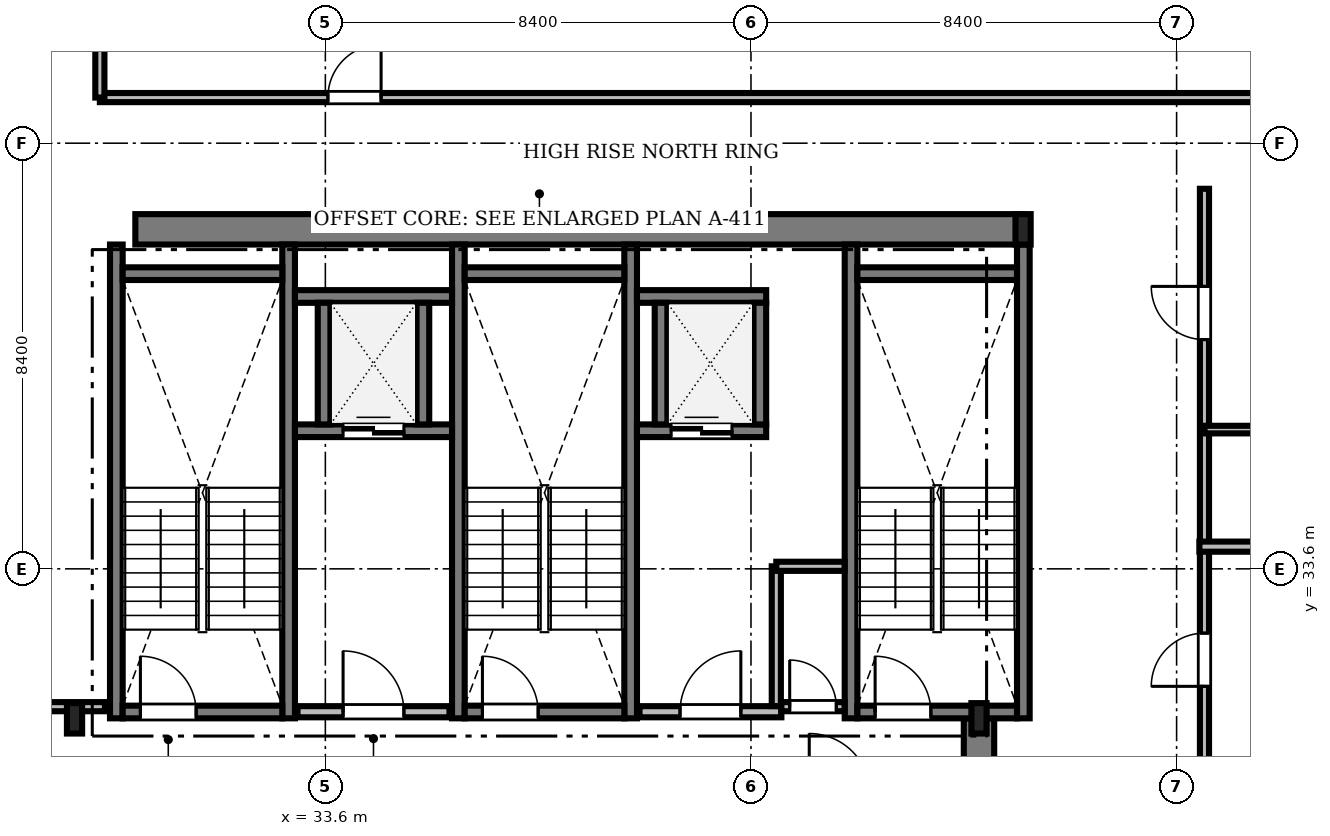
"""IFC4 building model, lengths in metres.
Left out: names, types, materials, properties, quantities, classifications, styles, units other than length and angle.
Written with IfcOpenShell. Run it as: python <this file> out.ifc"""

import sys

from ifc_helpers import new_model, si_unit, direction, frame, frame_2d, origin, origin_2d, place, context, subcontext, project, spatial, rectangle, i_section, extrude, source, transform, mapped, element, fill, save


model = new_model("IFC4")
c1 = context("Model", 3, precision=1e-05, world=origin(), true_north=direction((0.0, 1.0)))
c2 = subcontext(c1, "Body", "Model", "MODEL_VIEW")
j1 = project(units=[si_unit("LENGTHUNIT", "METRE"), si_unit("PLANEANGLEUNIT", "RADIAN")], contexts=[c1])
p1 = place(None, origin())
s1 = spatial("IfcSite", under=j1, at=p1, CompositionType="ELEMENT")
p2 = place(p1, origin())
s2 = spatial("IfcBuilding", under=s1, at=p2, CompositionType="ELEMENT")
p3 = place(p2, frame((0.0, 0.0, 246.65)))
s3 = spatial("IfcBuildingStorey", under=s2, at=p3, CompositionType="ELEMENT", Elevation=246.65)
m1 = source(origin(), c2, "Body", "SweptSolid", [
    extrude(rectangle(XDim=17.52, YDim=0.6, at=frame_2d((8.76, 0.0))), origin(), (0.0, 0.0, 1.0), 3.73),
])
p4 = place(p3, frame((29.85, 40.3, 0.0), z_axis=(0.0, 0.0, 1.0), x_axis=(1.0, 0.0, 0.0)))
e1 = element("IfcWall", 1, at=p4, inside=s3, PredefinedType="SHEAR", context=c2, shape_type="MappedRepresentation", body=[
    mapped(m1, transform((0.0, 0.0, 0.0), scale=1.0)),
])
m2 = source(origin(), c2, "Body", "SweptSolid", [
    extrude(rectangle(XDim=13.15, YDim=0.6, at=frame_2d((6.575, 0.0))), origin(), (0.0, 0.0, 1.0), 3.73),
])
p5 = place(p3, frame((46.5, 17.5, 0.0), z_axis=(0.0, 0.0, 1.0), x_axis=(0.0, 1.0, 0.0)))
e2 = element("IfcWall", 2, at=p5, inside=s3, PredefinedType="SHEAR", context=c2, shape_type="MappedRepresentation", body=[
    mapped(m2, transform((0.0, 0.0, 0.0), scale=1.0)),
])
m3 = source(origin(), c2, "Body", "SweptSolid", [
    extrude(i_section(OverallWidth=0.3, OverallDepth=0.6, WebThickness=0.015, FlangeThickness=0.03, FilletRadius=0.027, at=origin_2d()), origin(), (0.0, 0.0, 1.0), 3.73),
])
for number, where, z_axis, x_axis in (
    (3, (28.65, 30.65, 0.0), (0.0, 0.0, 1.0), (1.0, 0.0, 0.0)),
    (4, (46.5, 30.65, 0.0), (0.0, 0.0, 1.0), (1.0, 0.0, 0.0)),
    (5, (47.37, 40.3, 0.0), (0.0, 0.0, 1.0), (1.0, 0.0, 0.0)),
):
    element("IfcColumn", number, at=place(p3, frame(where, z_axis=z_axis, x_axis=x_axis)), inside=s3, PredefinedType="COLUMN", context=c2, shape_type="MappedRepresentation", body=[
        mapped(m3, transform((0.0, 0.0, 0.0), scale=1.0)),
    ])
m4 = source(origin(), c2, "Body", "SweptSolid", [
    extrude(rectangle(XDim=9.35, YDim=0.25, at=frame_2d((4.675, 0.0))), origin(), (0.0, 0.0, 1.0), 3.75),
])
for number, where, z_axis, x_axis in (
    (6, (29.475, 30.65, 0.0), (0.0, 0.0, 1.0), (0.0, 1.0, 0.0)),
    (7, (32.875, 30.65, 0.0), (0.0, 0.0, 1.0), (0.0, 1.0, 0.0)),
):
    element("IfcWall", number, at=place(p3, frame(where, z_axis=z_axis, x_axis=x_axis)), inside=s3, PredefinedType="SOLIDWALL", context=c2, shape_type="MappedRepresentation", body=[
        mapped(m4, transform((0.0, 0.0, 0.0), scale=1.0)),
    ])
m5 = source(origin(), c2, "Body", "SweptSolid", [
    extrude(rectangle(XDim=3.15, YDim=0.25, at=frame_2d((1.575, 0.0))), origin(), (0.0, 0.0, 1.0), 3.75),
])
p6 = place(p3, frame((29.6, 39.425, 0.0), z_axis=(0.0, 0.0, 1.0), x_axis=(1.0, 0.0, 0.0)))
e8 = element("IfcWall", 8, at=p6, inside=s3, PredefinedType="SOLIDWALL", context=c2, shape_type="MappedRepresentation", body=[
    mapped(m5, transform((0.0, 0.0, 0.0), scale=1.0)),
])
p7 = place(p3, frame((29.6, 30.775, 0.0), z_axis=(0.0, 0.0, 1.0), x_axis=(1.0, 0.0, 0.0)))
e9 = element("IfcWall", 9, at=p7, inside=s3, PredefinedType="SOLIDWALL", context=c2, shape_type="MappedRepresentation", body=[
    mapped(m5, transform((0.0, 0.0, 0.0), scale=1.0)),
])
m6 = source(origin(), c2, "Body", "SweptSolid", [
    extrude(rectangle(XDim=1.1, YDim=2.2, at=frame_2d((0.55, 1.1))), frame((0.0, 0.135, 0.0), z_axis=(0.0, -1.0, 0.0), x_axis=(1.0, 0.0, 0.0)), (0.0, 0.0, 1.0), 0.27),
])
p8 = place(p7, frame((0.35, 0.0, 0.0)))
e10 = element("IfcOpeningElement", 10, at=p8, cuts=e9, PredefinedType="OPENING", context=c2, shape_type="MappedRepresentation", body=[
    mapped(m6, transform((0.0, 0.0, 0.0), scale=1.0)),
])
for number, where, z_axis, x_axis in (
    (11, (36.225, 30.65, 0.0), (0.0, 0.0, 1.0), (0.0, 1.0, 0.0)),
    (12, (39.625, 30.65, 0.0), (0.0, 0.0, 1.0), (0.0, 1.0, 0.0)),
):
    element("IfcWall", number, at=place(p3, frame(where, z_axis=z_axis, x_axis=x_axis)), inside=s3, PredefinedType="SOLIDWALL", context=c2, shape_type="MappedRepresentation", body=[
        mapped(m4, transform((0.0, 0.0, 0.0), scale=1.0)),
    ])
p9 = place(p3, frame((36.35, 39.425, 0.0), z_axis=(0.0, 0.0, 1.0), x_axis=(1.0, 0.0, 0.0)))
e13 = element("IfcWall", 13, at=p9, inside=s3, PredefinedType="SOLIDWALL", context=c2, shape_type="MappedRepresentation", body=[
    mapped(m5, transform((0.0, 0.0, 0.0), scale=1.0)),
])
p10 = place(p3, frame((36.35, 30.775, 0.0), z_axis=(0.0, 0.0, 1.0), x_axis=(1.0, 0.0, 0.0)))
e14 = element("IfcWall", 14, at=p10, inside=s3, PredefinedType="SOLIDWALL", context=c2, shape_type="MappedRepresentation", body=[
    mapped(m5, transform((0.0, 0.0, 0.0), scale=1.0)),
])
p11 = place(p10, frame((0.35, 0.0, 0.0)))
e15 = element("IfcOpeningElement", 15, at=p11, cuts=e14, PredefinedType="OPENING", context=c2, shape_type="MappedRepresentation", body=[
    mapped(m6, transform((0.0, 0.0, 0.0), scale=1.0)),
])
for number, where, z_axis, x_axis in (
    (16, (43.975, 30.65, 0.0), (0.0, 0.0, 1.0), (0.0, 1.0, 0.0)),
    (17, (47.375, 30.65, 0.0), (0.0, 0.0, 1.0), (0.0, 1.0, 0.0)),
):
    element("IfcWall", number, at=place(p3, frame(where, z_axis=z_axis, x_axis=x_axis)), inside=s3, PredefinedType="SOLIDWALL", context=c2, shape_type="MappedRepresentation", body=[
        mapped(m4, transform((0.0, 0.0, 0.0), scale=1.0)),
    ])
p12 = place(p3, frame((44.1, 39.425, 0.0), z_axis=(0.0, 0.0, 1.0), x_axis=(1.0, 0.0, 0.0)))
e18 = element("IfcWall", 18, at=p12, inside=s3, PredefinedType="SOLIDWALL", context=c2, shape_type="MappedRepresentation", body=[
    mapped(m5, transform((0.0, 0.0, 0.0), scale=1.0)),
])
p13 = place(p3, frame((44.1, 30.775, 0.0), z_axis=(0.0, 0.0, 1.0), x_axis=(1.0, 0.0, 0.0)))
e19 = element("IfcWall", 19, at=p13, inside=s3, PredefinedType="SOLIDWALL", context=c2, shape_type="MappedRepresentation", body=[
    mapped(m5, transform((0.0, 0.0, 0.0), scale=1.0)),
])
p14 = place(p13, frame((0.35, 0.0, 0.0)))
e20 = element("IfcOpeningElement", 20, at=p14, cuts=e19, PredefinedType="OPENING", context=c2, shape_type="MappedRepresentation", body=[
    mapped(m6, transform((0.0, 0.0, 0.0), scale=1.0)),
])
m7 = source(origin(), c2, "Body", "SweptSolid", [
    extrude(rectangle(XDim=3.0, YDim=0.22, at=frame_2d((1.5, 0.0))), origin(), (0.0, 0.0, 1.0), 3.73),
])
p15 = place(p3, frame((33.05, 30.78, 0.0), z_axis=(0.0, 0.0, 1.0), x_axis=(1.0, 0.0, 0.0)))
e21 = element("IfcWall", 21, at=p15, inside=s3, PredefinedType="SOLIDWALL", context=c2, shape_type="MappedRepresentation", body=[
    mapped(m7, transform((0.0, 0.0, 0.0), scale=1.0)),
])
m8 = source(origin(), c2, "Body", "SweptSolid", [
    extrude(rectangle(XDim=1.2, YDim=2.2, at=frame_2d((0.6, 1.1))), frame((0.0, 0.12, 0.0), z_axis=(0.0, -1.0, 0.0), x_axis=(1.0, 0.0, 0.0)), (0.0, 0.0, 1.0), 0.24),
])
p16 = place(p15, frame((0.9, 0.0, 0.0)))
e22 = element("IfcOpeningElement", 22, at=p16, cuts=e21, PredefinedType="OPENING", context=c2, shape_type="MappedRepresentation", body=[
    mapped(m8, transform((0.0, 0.0, 0.0), scale=1.0)),
])
m9 = source(origin(), c2, "Body", "SweptSolid", [
    extrude(rectangle(XDim=2.8, YDim=0.22, at=frame_2d((1.4, 0.0))), origin(), (0.0, 0.0, 1.0), 3.73),
])
p17 = place(p3, frame((39.8, 30.78, 0.0), z_axis=(0.0, 0.0, 1.0), x_axis=(1.0, 0.0, 0.0)))
e23 = element("IfcWall", 23, at=p17, inside=s3, PredefinedType="SOLIDWALL", context=c2, shape_type="MappedRepresentation", body=[
    mapped(m9, transform((0.0, 0.0, 0.0), scale=1.0)),
])
p18 = place(p17, frame((0.8, 0.0, 0.0)))
e24 = element("IfcOpeningElement", 24, at=p18, cuts=e23, PredefinedType="OPENING", context=c2, shape_type="MappedRepresentation", body=[
    mapped(m8, transform((0.0, 0.0, 0.0), scale=1.0)),
])
m10 = source(origin(), c2, "Body", "SweptSolid", [
    extrude(rectangle(XDim=3.1, YDim=0.25, at=frame_2d((1.55, 0.0))), origin(), (0.0, 0.0, 1.0), 3.73),
])
p19 = place(p3, frame((33.0, 36.325, 0.0), z_axis=(0.0, 0.0, 1.0), x_axis=(1.0, 0.0, 0.0)))
e25 = element("IfcWall", 25, at=p19, inside=s3, PredefinedType="SOLIDWALL", context=c2, shape_type="MappedRepresentation", body=[
    mapped(m10, transform((0.0, 0.0, 0.0), scale=1.0)),
])
m11 = source(origin(), c2, "Body", "SweptSolid", [
    extrude(rectangle(XDim=1.2, YDim=2.25, at=frame_2d((0.6, 1.125))), frame((0.0, 0.135, 0.0), z_axis=(0.0, -1.0, 0.0), x_axis=(1.0, 0.0, 0.0)), (0.0, 0.0, 1.0), 0.27),
])
p20 = place(p19, frame((0.95, 0.0, 0.0)))
e26 = element("IfcOpeningElement", 26, at=p20, cuts=e25, PredefinedType="OPENING", context=c2, shape_type="MappedRepresentation", body=[
    mapped(m11, transform((0.0, 0.0, 0.0), scale=1.0)),
])
p21 = place(p3, frame((33.0, 38.975, 0.0), z_axis=(0.0, 0.0, 1.0), x_axis=(1.0, 0.0, 0.0)))
e27 = element("IfcWall", 27, at=p21, inside=s3, PredefinedType="SOLIDWALL", context=c2, shape_type="MappedRepresentation", body=[
    mapped(m10, transform((0.0, 0.0, 0.0), scale=1.0)),
])
m12 = source(origin(), c2, "Body", "SweptSolid", [
    extrude(rectangle(XDim=2.4, YDim=0.25, at=frame_2d((1.2, 0.0))), origin(), (0.0, 0.0, 1.0), 3.73),
])
for number, where, z_axis, x_axis in (
    (28, (33.575, 36.45, 0.0), (0.0, 0.0, 1.0), (0.0, 1.0, 0.0)),
    (29, (35.525, 36.45, 0.0), (0.0, 0.0, 1.0), (0.0, 1.0, 0.0)),
):
    element("IfcWall", number, at=place(p3, frame(where, z_axis=z_axis, x_axis=x_axis)), inside=s3, PredefinedType="SOLIDWALL", context=c2, shape_type="MappedRepresentation", body=[
        mapped(m12, transform((0.0, 0.0, 0.0), scale=1.0)),
    ])
m13 = source(origin(), c2, "Body", "SweptSolid", [
    extrude(rectangle(XDim=2.55, YDim=0.25, at=frame_2d((1.275, 0.0))), origin(), (0.0, 0.0, 1.0), 3.73),
])
p22 = place(p3, frame((39.75, 36.325, 0.0), z_axis=(0.0, 0.0, 1.0), x_axis=(1.0, 0.0, 0.0)))
e30 = element("IfcWall", 30, at=p22, inside=s3, PredefinedType="SOLIDWALL", context=c2, shape_type="MappedRepresentation", body=[
    mapped(m13, transform((0.0, 0.0, 0.0), scale=1.0)),
])
p23 = place(p22, frame((0.675, 0.0, 0.0)))
e31 = element("IfcOpeningElement", 31, at=p23, cuts=e30, PredefinedType="OPENING", context=c2, shape_type="MappedRepresentation", body=[
    mapped(m11, transform((0.0, 0.0, 0.0), scale=1.0)),
])
p24 = place(p3, frame((39.75, 38.975, 0.0), z_axis=(0.0, 0.0, 1.0), x_axis=(1.0, 0.0, 0.0)))
e32 = element("IfcWall", 32, at=p24, inside=s3, PredefinedType="SOLIDWALL", context=c2, shape_type="MappedRepresentation", body=[
    mapped(m13, transform((0.0, 0.0, 0.0), scale=1.0)),
])
for number, where, z_axis, x_axis in (
    (33, (40.225, 36.45, 0.0), (0.0, 0.0, 1.0), (0.0, 1.0, 0.0)),
    (34, (42.175, 36.45, 0.0), (0.0, 0.0, 1.0), (0.0, 1.0, 0.0)),
):
    element("IfcWall", number, at=place(p3, frame(where, z_axis=z_axis, x_axis=x_axis)), inside=s3, PredefinedType="SOLIDWALL", context=c2, shape_type="MappedRepresentation", body=[
        mapped(m12, transform((0.0, 0.0, 0.0), scale=1.0)),
    ])
m14 = source(origin(), c2, "Body", "SweptSolid", [
    extrude(rectangle(XDim=32.928, YDim=0.18, at=frame_2d((16.464, 0.0))), origin(), (0.0, 0.0, 1.0), 2.972),
])
p25 = place(p3, frame((29.15, 42.9, 0.0), z_axis=(0.0, 0.0, 1.0), x_axis=(1.0, 0.0, 0.0)))
e35 = element("IfcWall", 35, at=p25, inside=s3, PredefinedType="PARTITIONING", context=c2, shape_type="MappedRepresentation", body=[
    mapped(m14, transform((0.0, 0.0, 0.0), scale=1.0)),
])
m15 = source(origin(), c2, "Body", "SweptSolid", [
    extrude(rectangle(XDim=1.05, YDim=2.2, at=frame_2d((0.525, 1.1))), frame((0.0, 0.1, 0.0), z_axis=(0.0, -1.0, 0.0), x_axis=(1.0, 0.0, 0.0)), (0.0, 0.0, 1.0), 0.2),
])
p26 = place(p25, frame((4.5, 0.0, 0.0)))
e36 = element("IfcOpeningElement", 36, at=p26, cuts=e35, PredefinedType="OPENING", context=c2, shape_type="MappedRepresentation", body=[
    mapped(m15, transform((0.0, 0.0, 0.0), scale=1.0)),
])
m16 = source(origin(), c2, "Body", "SweptSolid", [
    extrude(rectangle(XDim=27.59, YDim=0.18, at=frame_2d((13.795, 0.0))), origin(), (0.0, 0.0, 1.0), 3.172),
])
p27 = place(p3, frame((50.95, 13.51, 0.0), z_axis=(0.0, 0.0, 1.0), x_axis=(0.0, 1.0, 0.0)))
e37 = element("IfcWall", 37, at=p27, inside=s3, PredefinedType="PARTITIONING", context=c2, shape_type="MappedRepresentation", body=[
    mapped(m16, transform((0.0, 0.0, 0.0), scale=1.0)),
])
p28 = place(p27, frame((4.086, 0.0, 0.0)))
e38 = element("IfcOpeningElement", 38, at=p28, cuts=e37, PredefinedType="OPENING", context=c2, shape_type="MappedRepresentation", body=[
    mapped(m15, transform((0.0, 0.0, 0.0), scale=1.0)),
])
p29 = place(p27, frame((9.744, 0.0, 0.0)))
e39 = element("IfcOpeningElement", 39, at=p29, cuts=e37, PredefinedType="OPENING", context=c2, shape_type="MappedRepresentation", body=[
    mapped(m15, transform((0.0, 0.0, 0.0), scale=1.0)),
])
p30 = place(p27, frame((17.771, 0.0, 0.0)))
e40 = element("IfcOpeningElement", 40, at=p30, cuts=e37, PredefinedType="OPENING", context=c2, shape_type="MappedRepresentation", body=[
    mapped(m15, transform((0.0, 0.0, 0.0), scale=1.0)),
])
p31 = place(p27, frame((24.614, 0.0, 0.0)))
e41 = element("IfcOpeningElement", 41, at=p31, cuts=e37, PredefinedType="OPENING", context=c2, shape_type="MappedRepresentation", body=[
    mapped(m15, transform((0.0, 0.0, 0.0), scale=1.0)),
])
m17 = source(origin(), c2, "Body", "SweptSolid", [
    extrude(rectangle(XDim=13.328, YDim=0.18, at=frame_2d((6.664, 0.0))), origin(), (0.0, 0.0, 1.0), 2.972),
])
p32 = place(p3, frame((15.922, 30.88, 0.0), z_axis=(0.0, 0.0, 1.0), x_axis=(1.0, 0.0, 0.0)))
e42 = element("IfcWall", 42, at=p32, inside=s3, PredefinedType="PARTITIONING", context=c2, shape_type="MappedRepresentation", body=[
    mapped(m17, transform((0.0, 0.0, 0.0), scale=1.0)),
])
p33 = place(p32, frame((6.278, 0.0, 0.0)))
e43 = element("IfcOpeningElement", 43, at=p33, cuts=e42, PredefinedType="OPENING", context=c2, shape_type="MappedRepresentation", body=[
    mapped(m15, transform((0.0, 0.0, 0.0), scale=1.0)),
])
m18 = source(origin(), c2, "Body", "SweptSolid", [
    extrude(rectangle(XDim=1.248, YDim=0.18, at=frame_2d((0.624, 0.0))), origin(), (0.0, 0.0, 1.0), 3.73),
])
p34 = place(p3, frame((42.6, 30.88, 0.0), z_axis=(0.0, 0.0, 1.0), x_axis=(1.0, 0.0, 0.0)))
e44 = element("IfcWall", 44, at=p34, inside=s3, PredefinedType="PARTITIONING", context=c2, shape_type="MappedRepresentation", body=[
    mapped(m18, transform((0.0, 0.0, 0.0), scale=1.0)),
])
m19 = source(origin(), c2, "Body", "SweptSolid", [
    extrude(rectangle(XDim=0.92, YDim=2.1, at=frame_2d((0.46, 1.05))), frame((0.0, 0.1, 0.0), z_axis=(0.0, -1.0, 0.0), x_axis=(1.0, 0.0, 0.0)), (0.0, 0.0, 1.0), 0.2),
])
p35 = place(p34, frame((0.164, 0.0, 0.0)))
e45 = element("IfcOpeningElement", 45, at=p35, cuts=e44, PredefinedType="OPENING", context=c2, shape_type="MappedRepresentation", body=[
    mapped(m19, transform((0.0, 0.0, 0.0), scale=1.0)),
])
m20 = source(origin(), c2, "Body", "SweptSolid", [
    extrude(rectangle(XDim=11.228, YDim=0.2, at=frame_2d((5.614, 0.0))), origin(), (0.0, 0.0, 1.0), 2.972),
])
p36 = place(p3, frame((50.85, 34.038, 0.0), z_axis=(0.0, 0.0, 1.0), x_axis=(1.0, 0.0, 0.0)))
e46 = element("IfcWall", 46, at=p36, inside=s3, PredefinedType="PARTITIONING", context=c2, shape_type="MappedRepresentation", body=[
    mapped(m20, transform((0.0, 0.0, 0.0), scale=1.0)),
])
m21 = source(origin(), c2, "Body", "SweptSolid", [
    extrude(rectangle(XDim=5.378, YDim=0.18, at=frame_2d((2.689, 0.0))), origin(), (0.0, 0.0, 1.0), 2.972),
])
p37 = place(p3, frame((29.15, 42.9, 0.0), z_axis=(0.0, 0.0, 1.0), x_axis=(0.0, 1.0, 0.0)))
e47 = element("IfcWall", 47, at=p37, inside=s3, PredefinedType="PARTITIONING", context=c2, shape_type="MappedRepresentation", body=[
    mapped(m21, transform((0.0, 0.0, 0.0), scale=1.0)),
])
m22 = source(origin(), c2, "Body", "SweptSolid", [
    extrude(rectangle(XDim=2.758, YDim=0.18, at=frame_2d((1.379, 0.0))), origin(), (0.0, 0.0, 1.0), 3.73),
])
p38 = place(p3, frame((42.5, 30.892, 0.0), z_axis=(0.0, 0.0, 1.0), x_axis=(0.0, 1.0, 0.0)))
e48 = element("IfcWall", 48, at=p38, inside=s3, PredefinedType="PARTITIONING", context=c2, shape_type="MappedRepresentation", body=[
    mapped(m22, transform((0.0, 0.0, 0.0), scale=1.0)),
])
m23 = source(origin(), c2, "Body", "SweptSolid", [
    extrude(rectangle(XDim=2.36, YDim=0.15, at=frame_2d((1.18, 0.0))), origin(), (0.0, 0.0, 1.0), 3.73),
])
p39 = place(p3, frame((50.95, 36.348, 0.0), z_axis=(0.0, 0.0, 1.0), x_axis=(1.0, 0.0, 0.0)))
e49 = element("IfcWall", 49, at=p39, inside=s3, PredefinedType="PARTITIONING", context=c2, shape_type="MappedRepresentation", body=[
    mapped(m23, transform((0.0, 0.0, 0.0), scale=1.0)),
])
m24 = source(origin(), c2, "Body", "SweptSolid", [
    extrude(rectangle(XDim=1.348, YDim=0.18, at=frame_2d((0.674, 0.0))), origin(), (0.0, 0.0, 1.0), 3.73),
])
p40 = place(p3, frame((42.5, 33.65, 0.0), z_axis=(0.0, 0.0, 1.0), x_axis=(1.0, 0.0, 0.0)))
e50 = element("IfcWall", 50, at=p40, inside=s3, PredefinedType="PARTITIONING", context=c2, shape_type="MappedRepresentation", body=[
    mapped(m24, transform((0.0, 0.0, 0.0), scale=1.0)),
])
m25 = source(origin(), c2, "Body", "SweptSolid", [
    extrude(rectangle(XDim=1.1, YDim=2.2, at=frame_2d((0.55, 1.1))), frame((0.0, 0.025, 0.0), z_axis=(0.0, -1.0, 0.0), x_axis=(1.0, 0.0, 0.0)), (0.0, 0.0, 1.0), 0.05),
])
p41 = place(p8, origin())
e51 = element("IfcDoor", 51, at=p41, inside=s3, OperationType="SINGLE_SWING_LEFT", PredefinedType="DOOR", context=c2, shape_type="MappedRepresentation", body=[
    mapped(m25, transform((0.0, 0.0, 0.0), scale=1.0)),
])
fill(e10, e51)
p42 = place(p11, origin())
e52 = element("IfcDoor", 52, at=p42, inside=s3, OperationType="SINGLE_SWING_LEFT", PredefinedType="DOOR", context=c2, shape_type="MappedRepresentation", body=[
    mapped(m25, transform((0.0, 0.0, 0.0), scale=1.0)),
])
fill(e15, e52)
p43 = place(p14, origin())
e53 = element("IfcDoor", 53, at=p43, inside=s3, OperationType="SINGLE_SWING_LEFT", PredefinedType="DOOR", context=c2, shape_type="MappedRepresentation", body=[
    mapped(m25, transform((0.0, 0.0, 0.0), scale=1.0)),
])
fill(e20, e53)
m26 = source(origin(), c2, "Body", "SweptSolid", [
    extrude(rectangle(XDim=1.2, YDim=2.2, at=frame_2d((0.6, 1.1))), frame((0.0, 0.025, 0.0), z_axis=(0.0, -1.0, 0.0), x_axis=(1.0, 0.0, 0.0)), (0.0, 0.0, 1.0), 0.05),
])
p44 = place(p16, origin())
e54 = element("IfcDoor", 54, at=p44, inside=s3, OperationType="SINGLE_SWING_LEFT", PredefinedType="DOOR", context=c2, shape_type="MappedRepresentation", body=[
    mapped(m26, transform((0.0, 0.0, 0.0), scale=1.0)),
])
fill(e22, e54)
p45 = place(p18, origin())
e55 = element("IfcDoor", 55, at=p45, inside=s3, OperationType="SINGLE_SWING_RIGHT", PredefinedType="DOOR", context=c2, shape_type="MappedRepresentation", body=[
    mapped(m26, transform((0.0, 0.0, 0.0), scale=1.0)),
])
fill(e24, e55)
m27 = source(origin(), c2, "Body", "SweptSolid", [
    extrude(rectangle(XDim=1.2, YDim=2.25, at=frame_2d((0.6, 1.125))), frame((0.0, 0.025, 0.0), z_axis=(0.0, -1.0, 0.0), x_axis=(1.0, 0.0, 0.0)), (0.0, 0.0, 1.0), 0.05),
])
p46 = place(p20, origin())
e56 = element("IfcDoor", 56, at=p46, inside=s3, OperationType="DOUBLE_DOOR_SLIDING", PredefinedType="DOOR", context=c2, shape_type="MappedRepresentation", body=[
    mapped(m27, transform((0.0, 0.0, 0.0), scale=1.0)),
])
fill(e26, e56)
p47 = place(p23, origin())
e57 = element("IfcDoor", 57, at=p47, inside=s3, OperationType="DOUBLE_DOOR_SLIDING", PredefinedType="DOOR", context=c2, shape_type="MappedRepresentation", body=[
    mapped(m27, transform((0.0, 0.0, 0.0), scale=1.0)),
])
fill(e31, e57)
m28 = source(origin(), c2, "Body", "SweptSolid", [
    extrude(rectangle(XDim=1.05, YDim=2.2, at=frame_2d((0.525, 1.1))), frame((0.0, 0.025, 0.0), z_axis=(0.0, -1.0, 0.0), x_axis=(1.0, 0.0, 0.0)), (0.0, 0.0, 1.0), 0.05),
])
p48 = place(p26, origin())
e58 = element("IfcDoor", 58, at=p48, inside=s3, OperationType="SINGLE_SWING_RIGHT", PredefinedType="DOOR", context=c2, shape_type="MappedRepresentation", body=[
    mapped(m28, transform((0.0, 0.0, 0.0), scale=1.0)),
])
fill(e36, e58)
p49 = place(p30, origin())
e59 = element("IfcDoor", 59, at=p49, inside=s3, OperationType="SINGLE_SWING_LEFT", PredefinedType="DOOR", context=c2, shape_type="MappedRepresentation", body=[
    mapped(m28, transform((0.0, 0.0, 0.0), scale=1.0)),
])
fill(e40, e59)
p50 = place(p31, origin())
e60 = element("IfcDoor", 60, at=p50, inside=s3, OperationType="SINGLE_SWING_RIGHT", PredefinedType="DOOR", context=c2, shape_type="MappedRepresentation", body=[
    mapped(m28, transform((0.0, 0.0, 0.0), scale=1.0)),
])
fill(e41, e60)
m29 = source(origin(), c2, "Body", "SweptSolid", [
    extrude(rectangle(XDim=0.92, YDim=2.1, at=frame_2d((0.46, 1.05))), frame((0.0, 0.025, 0.0), z_axis=(0.0, -1.0, 0.0), x_axis=(1.0, 0.0, 0.0)), (0.0, 0.0, 1.0), 0.05),
])
p51 = place(p35, origin())
e61 = element("IfcDoor", 61, at=p51, inside=s3, OperationType="SINGLE_SWING_LEFT", PredefinedType="DOOR", context=c2, shape_type="MappedRepresentation", body=[
    mapped(m29, transform((0.0, 0.0, 0.0), scale=1.0)),
])
fill(e45, e61)
save(model, sys.argv[1])
